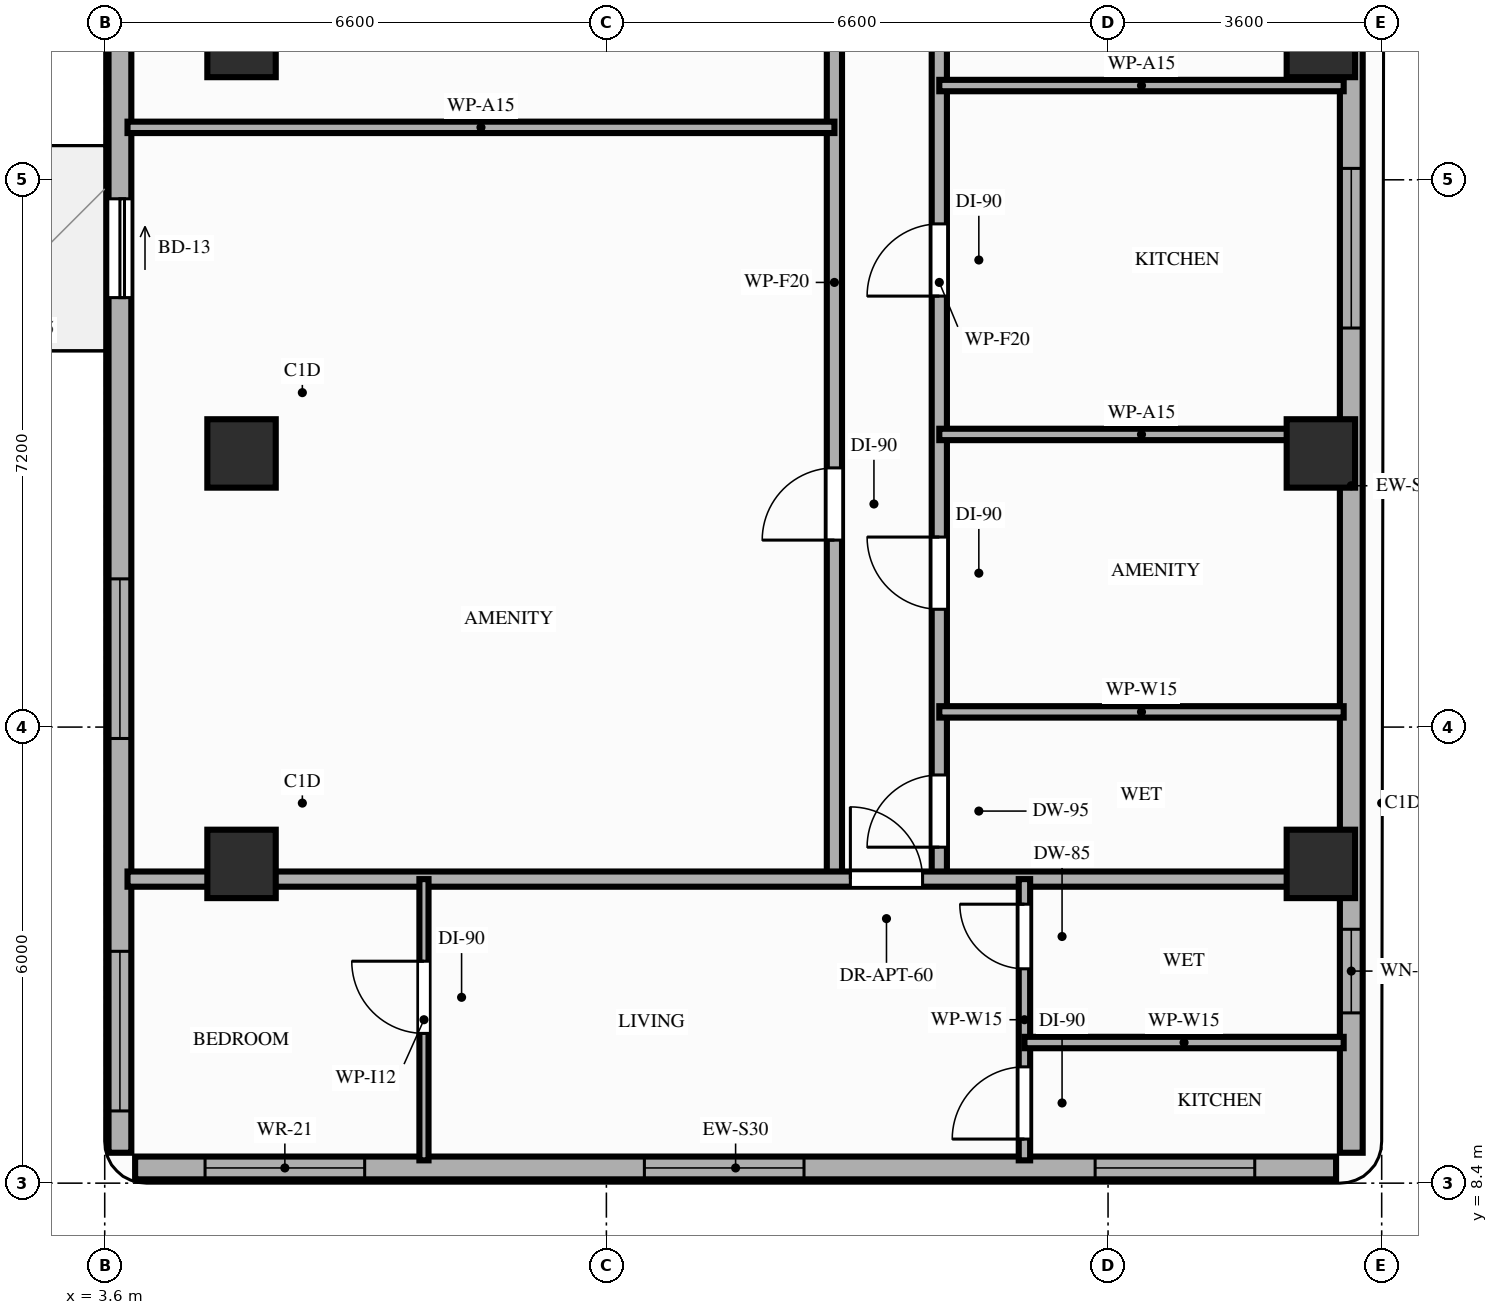
"""IFC4 building model, lengths in metres.
Left out: names, types, materials, properties, quantities, classifications, styles, units other than length and angle.
Written with IfcOpenShell. Run it as: python <this file> out.ifc"""

import sys

from ifc_helpers import new_model, si_unit, direction, frame, frame_2d, origin, origin_2d, place, context, subcontext, project, spatial, rectangle, extrude, element, fill, save


model = new_model("IFC4")
c1 = context("Model", 3, precision=1e-05, world=origin(), true_north=direction((0.0, 1.0)))
c2 = subcontext(c1, "Body", "Model", "MODEL_VIEW")
j1 = project(units=[si_unit("LENGTHUNIT", "METRE"), si_unit("PLANEANGLEUNIT", "RADIAN")], contexts=[c1])
p1 = place(None, origin())
s1 = spatial("IfcSite", under=j1, at=p1, CompositionType="ELEMENT")
p2 = place(p1, origin())
s2 = spatial("IfcBuilding", under=s1, at=p2, CompositionType="ELEMENT")
p3 = place(p2, frame((0.0, 0.0, 163.2)))
s3 = spatial("IfcBuildingStorey", under=s2, at=p3, CompositionType="ELEMENT", Elevation=163.2)
for number, where, z_axis, x_axis in (
    (1, (5.4, 12.6, 0.0), (0.0, 0.0, 1.0), (1.0, 0.0, 0.0)),
    (2, (19.6, 12.6, 0.0), (0.0, 0.0, 1.0), (1.0, 0.0, 0.0)),
    (3, (5.4, 18.0, 0.0), (0.0, 0.0, 1.0), (1.0, 0.0, 0.0)),
    (4, (19.6, 18.0, 0.0), (0.0, 0.0, 1.0), (1.0, 0.0, 0.0)),
    (5, (5.4, 23.4, 0.0), (0.0, 0.0, 1.0), (1.0, 0.0, 0.0)),
    (6, (19.6, 23.4, 0.0), (0.0, 0.0, 1.0), (1.0, 0.0, 0.0)),
):
    element("IfcColumn", number, at=place(p3, frame(where, z_axis=z_axis, x_axis=x_axis)), inside=s3, PredefinedType="COLUMN", context=c2, shape_type="SweptSolid", body=[
        extrude(rectangle(XDim=0.9, YDim=0.9, at=origin_2d()), origin(), (0.0, 0.0, 1.0), 3.2),
    ])
p4 = place(p3, frame((4.0, 8.6, 0.0), z_axis=(0.0, 0.0, 1.0), x_axis=(1.0, 0.0, 0.0)))
e7 = element("IfcWall", 7, at=p4, inside=s3, PredefinedType="STANDARD", context=c2, shape_type="SweptSolid", body=[
    extrude(rectangle(XDim=15.8, YDim=0.3, at=frame_2d((7.9, 0.0))), origin(), (0.0, 0.0, 1.0), 3.02),
])
p5 = place(p4, frame((0.92, 0.0, 0.85)))
e8 = element("IfcOpeningElement", 8, at=p5, cuts=e7, PredefinedType="OPENING", context=c2, shape_type="SweptSolid", body=[
    extrude(rectangle(XDim=2.1, YDim=1.8, at=frame_2d((1.05, 0.9))), frame((0.0, 0.16, 0.0), z_axis=(0.0, -1.0, 0.0), x_axis=(1.0, 0.0, 0.0)), (0.0, 0.0, 1.0), 0.32),
])
p6 = place(p4, frame((6.7, 0.0, 0.85)))
e9 = element("IfcOpeningElement", 9, at=p6, cuts=e7, PredefinedType="OPENING", context=c2, shape_type="SweptSolid", body=[
    extrude(rectangle(XDim=2.1, YDim=1.8, at=frame_2d((1.05, 0.9))), frame((0.0, 0.16, 0.0), z_axis=(0.0, -1.0, 0.0), x_axis=(1.0, 0.0, 0.0)), (0.0, 0.0, 1.0), 0.32),
])
p7 = place(p4, frame((12.63, 0.0, 0.85)))
e10 = element("IfcOpeningElement", 10, at=p7, cuts=e7, PredefinedType="OPENING", context=c2, shape_type="SweptSolid", body=[
    extrude(rectangle(XDim=2.1, YDim=1.8, at=frame_2d((1.05, 0.9))), frame((0.0, 0.16, 0.0), z_axis=(0.0, -1.0, 0.0), x_axis=(1.0, 0.0, 0.0)), (0.0, 0.0, 1.0), 0.32),
])
p8 = place(p3, frame((3.8, 42.1, 0.0), z_axis=(0.0, 0.0, 1.0), x_axis=(0.0, -1.0, 0.0)))
e11 = element("IfcWall", 11, at=p8, inside=s3, PredefinedType="STANDARD", context=c2, shape_type="SweptSolid", body=[
    extrude(rectangle(XDim=33.3, YDim=0.3, at=frame_2d((16.65, 0.0))), origin(), (0.0, 0.0, 1.0), 2.71),
])
p9 = place(p8, frame((20.75, 0.0, 0.0)))
e12 = element("IfcOpeningElement", 12, at=p9, cuts=e11, PredefinedType="OPENING", context=c2, shape_type="SweptSolid", body=[
    extrude(rectangle(XDim=1.3, YDim=2.08, at=frame_2d((0.65, 1.04))), frame((0.0, 0.16, 0.0), z_axis=(0.0, -1.0, 0.0), x_axis=(1.0, 0.0, 0.0)), (0.0, 0.0, 1.0), 0.32),
])
p10 = place(p8, frame((30.65, 0.0, 0.85)))
e13 = element("IfcOpeningElement", 13, at=p10, cuts=e11, PredefinedType="OPENING", context=c2, shape_type="SweptSolid", body=[
    extrude(rectangle(XDim=2.1, YDim=1.61, at=frame_2d((1.05, 0.805))), frame((0.0, 0.16, 0.0), z_axis=(0.0, -1.0, 0.0), x_axis=(1.0, 0.0, 0.0)), (0.0, 0.0, 1.0), 0.32),
])
p11 = place(p8, frame((25.75, 0.0, 0.85)))
e14 = element("IfcOpeningElement", 14, at=p11, cuts=e11, PredefinedType="OPENING", context=c2, shape_type="SweptSolid", body=[
    extrude(rectangle(XDim=2.1, YDim=1.61, at=frame_2d((1.05, 0.805))), frame((0.0, 0.16, 0.0), z_axis=(0.0, -1.0, 0.0), x_axis=(1.0, 0.0, 0.0)), (0.0, 0.0, 1.0), 0.32),
])
p12 = place(p8, frame((14.95, 0.0, 0.85)))
e15 = element("IfcOpeningElement", 15, at=p12, cuts=e11, PredefinedType="OPENING", context=c2, shape_type="SweptSolid", body=[
    extrude(rectangle(XDim=2.1, YDim=1.61, at=frame_2d((1.05, 0.805))), frame((0.0, 0.16, 0.0), z_axis=(0.0, -1.0, 0.0), x_axis=(1.0, 0.0, 0.0)), (0.0, 0.0, 1.0), 0.32),
])
p13 = place(p8, frame((9.75, 0.0, 0.85)))
e16 = element("IfcOpeningElement", 16, at=p13, cuts=e11, PredefinedType="OPENING", context=c2, shape_type="SweptSolid", body=[
    extrude(rectangle(XDim=2.1, YDim=1.61, at=frame_2d((1.05, 0.805))), frame((0.0, 0.16, 0.0), z_axis=(0.0, -1.0, 0.0), x_axis=(1.0, 0.0, 0.0)), (0.0, 0.0, 1.0), 0.32),
])
p14 = place(p8, frame((3.65, 0.0, 0.85)))
e17 = element("IfcOpeningElement", 17, at=p14, cuts=e11, PredefinedType="OPENING", context=c2, shape_type="SweptSolid", body=[
    extrude(rectangle(XDim=2.1, YDim=1.61, at=frame_2d((1.05, 0.805))), frame((0.0, 0.16, 0.0), z_axis=(0.0, -1.0, 0.0), x_axis=(1.0, 0.0, 0.0)), (0.0, 0.0, 1.0), 0.32),
])
p15 = place(p3, frame((20.0, 8.8, 0.0), z_axis=(0.0, 0.0, 1.0), x_axis=(0.0, 1.0, 0.0)))
e18 = element("IfcWall", 18, at=p15, inside=s3, PredefinedType="STANDARD", context=c2, shape_type="SweptSolid", body=[
    extrude(rectangle(XDim=17.55, YDim=0.3, at=frame_2d((8.775, 0.0))), origin(), (0.0, 0.0, 1.0), 2.45),
])
p16 = place(p15, frame((1.84, 0.0, 0.85)))
e19 = element("IfcOpeningElement", 19, at=p16, cuts=e18, PredefinedType="OPENING", context=c2, shape_type="SweptSolid", body=[
    extrude(rectangle(XDim=1.1, YDim=1.35, at=frame_2d((0.55, 0.675))), frame((0.0, 0.16, 0.0), z_axis=(0.0, -1.0, 0.0), x_axis=(1.0, 0.0, 0.0)), (0.0, 0.0, 1.0), 0.32),
])
p17 = place(p15, frame((10.85, 0.0, 0.85)))
e20 = element("IfcOpeningElement", 20, at=p17, cuts=e18, PredefinedType="OPENING", context=c2, shape_type="SweptSolid", body=[
    extrude(rectangle(XDim=2.1, YDim=1.35, at=frame_2d((1.05, 0.675))), frame((0.0, 0.16, 0.0), z_axis=(0.0, -1.0, 0.0), x_axis=(1.0, 0.0, 0.0)), (0.0, 0.0, 1.0), 0.32),
])
p18 = place(p3, frame((13.2, 12.4, 0.0), z_axis=(0.0, 0.0, 1.0), x_axis=(0.0, 1.0, 0.0)))
e21 = element("IfcWall", 21, at=p18, inside=s3, PredefinedType="PARTITIONING", context=c2, shape_type="SweptSolid", body=[
    extrude(rectangle(XDim=15.7, YDim=0.2, at=frame_2d((7.85, 0.0))), origin(), (0.0, 0.0, 1.0), 2.45),
])
p19 = place(p18, frame((4.46, 0.0, 0.0)))
e22 = element("IfcOpeningElement", 22, at=p19, cuts=e21, PredefinedType="OPENING", context=c2, shape_type="SweptSolid", body=[
    extrude(rectangle(XDim=0.95, YDim=2.15, at=frame_2d((0.475, 1.075))), frame((0.0, 0.11, 0.0), z_axis=(0.0, -1.0, 0.0), x_axis=(1.0, 0.0, 0.0)), (0.0, 0.0, 1.0), 0.22),
])
p20 = place(p18, frame((12.31, 0.0, 0.0)))
e23 = element("IfcOpeningElement", 23, at=p20, cuts=e21, PredefinedType="OPENING", context=c2, shape_type="SweptSolid", body=[
    extrude(rectangle(XDim=0.95, YDim=2.15, at=frame_2d((0.475, 1.075))), frame((0.0, 0.11, 0.0), z_axis=(0.0, -1.0, 0.0), x_axis=(1.0, 0.0, 0.0)), (0.0, 0.0, 1.0), 0.22),
])
p21 = place(p3, frame((14.58, 12.4, 0.0), z_axis=(0.0, 0.0, 1.0), x_axis=(0.0, 1.0, 0.0)))
e24 = element("IfcWall", 24, at=p21, inside=s3, PredefinedType="PARTITIONING", context=c2, shape_type="SweptSolid", body=[
    extrude(rectangle(XDim=15.7, YDim=0.2, at=frame_2d((7.85, 0.0))), origin(), (0.0, 0.0, 1.0), 2.45),
])
p22 = place(p21, frame((0.42, 0.0, 0.0)))
e25 = element("IfcOpeningElement", 25, at=p22, cuts=e24, PredefinedType="OPENING", context=c2, shape_type="SweptSolid", body=[
    extrude(rectangle(XDim=0.95, YDim=2.1, at=frame_2d((0.475, 1.05))), frame((0.0, 0.11, 0.0), z_axis=(0.0, -1.0, 0.0), x_axis=(1.0, 0.0, 0.0)), (0.0, 0.0, 1.0), 0.22),
])
p23 = place(p21, frame((3.55, 0.0, 0.0)))
e26 = element("IfcOpeningElement", 26, at=p23, cuts=e24, PredefinedType="OPENING", context=c2, shape_type="SweptSolid", body=[
    extrude(rectangle(XDim=0.95, YDim=2.15, at=frame_2d((0.475, 1.075))), frame((0.0, 0.11, 0.0), z_axis=(0.0, -1.0, 0.0), x_axis=(1.0, 0.0, 0.0)), (0.0, 0.0, 1.0), 0.22),
])
p24 = place(p21, frame((7.67, 0.0, 0.0)))
e27 = element("IfcOpeningElement", 27, at=p24, cuts=e24, PredefinedType="OPENING", context=c2, shape_type="SweptSolid", body=[
    extrude(rectangle(XDim=0.95, YDim=2.15, at=frame_2d((0.475, 1.075))), frame((0.0, 0.11, 0.0), z_axis=(0.0, -1.0, 0.0), x_axis=(1.0, 0.0, 0.0)), (0.0, 0.0, 1.0), 0.22),
])
p25 = place(p21, frame((12.59, 0.0, 0.0)))
e28 = element("IfcOpeningElement", 28, at=p25, cuts=e24, PredefinedType="OPENING", context=c2, shape_type="SweptSolid", body=[
    extrude(rectangle(XDim=0.95, YDim=2.15, at=frame_2d((0.475, 1.075))), frame((0.0, 0.11, 0.0), z_axis=(0.0, -1.0, 0.0), x_axis=(1.0, 0.0, 0.0)), (0.0, 0.0, 1.0), 0.22),
])
p26 = place(p3, frame((3.9, 12.4, 0.0), z_axis=(0.0, 0.0, 1.0), x_axis=(1.0, 0.0, 0.0)))
e29 = element("IfcWall", 29, at=p26, inside=s3, PredefinedType="PARTITIONING", context=c2, shape_type="SweptSolid", body=[
    extrude(rectangle(XDim=16.0, YDim=0.2, at=frame_2d((8.0, 0.0))), origin(), (0.0, 0.0, 1.0), 2.45),
])
p27 = place(p26, frame((9.51, 0.0, 0.0)))
e30 = element("IfcOpeningElement", 30, at=p27, cuts=e29, PredefinedType="OPENING", context=c2, shape_type="SweptSolid", body=[
    extrude(rectangle(XDim=0.95, YDim=2.15, at=frame_2d((0.475, 1.075))), frame((0.0, 0.11, 0.0), z_axis=(0.0, -1.0, 0.0), x_axis=(1.0, 0.0, 0.0)), (0.0, 0.0, 1.0), 0.22),
])
p28 = place(p3, frame((7.8, 8.7, 0.0), z_axis=(0.0, 0.0, 1.0), x_axis=(0.0, 1.0, 0.0)))
e31 = element("IfcWall", 31, at=p28, inside=s3, PredefinedType="PARTITIONING", context=c2, shape_type="SweptSolid", body=[
    extrude(rectangle(XDim=3.7, YDim=0.12, at=frame_2d((1.85, 0.0))), origin(), (0.0, 0.0, 1.0), 2.45),
])
p29 = place(p28, frame((1.67, 0.0, 0.0)))
e32 = element("IfcOpeningElement", 32, at=p29, cuts=e31, PredefinedType="OPENING", context=c2, shape_type="SweptSolid", body=[
    extrude(rectangle(XDim=0.95, YDim=2.15, at=frame_2d((0.475, 1.075))), frame((0.0, 0.07, 0.0), z_axis=(0.0, -1.0, 0.0), x_axis=(1.0, 0.0, 0.0)), (0.0, 0.0, 1.0), 0.14),
])
p30 = place(p3, frame((15.7, 8.7, 0.0), z_axis=(0.0, 0.0, 1.0), x_axis=(0.0, 1.0, 0.0)))
e33 = element("IfcWall", 33, at=p30, inside=s3, PredefinedType="PARTITIONING", context=c2, shape_type="SweptSolid", body=[
    extrude(rectangle(XDim=3.7, YDim=0.15, at=frame_2d((1.85, 0.0))), origin(), (0.0, 0.0, 1.0), 2.45),
])
p31 = place(p30, frame((0.28, 0.0, 0.0)))
e34 = element("IfcOpeningElement", 34, at=p31, cuts=e33, PredefinedType="OPENING", context=c2, shape_type="SweptSolid", body=[
    extrude(rectangle(XDim=0.95, YDim=2.15, at=frame_2d((0.475, 1.075))), frame((0.0, 0.085, 0.0), z_axis=(0.0, -1.0, 0.0), x_axis=(1.0, 0.0, 0.0)), (0.0, 0.0, 1.0), 0.17),
])
p32 = place(p30, frame((2.52, 0.0, 0.0)))
e35 = element("IfcOpeningElement", 35, at=p32, cuts=e33, PredefinedType="OPENING", context=c2, shape_type="SweptSolid", body=[
    extrude(rectangle(XDim=0.85, YDim=2.1, at=frame_2d((0.425, 1.05))), frame((0.0, 0.085, 0.0), z_axis=(0.0, -1.0, 0.0), x_axis=(1.0, 0.0, 0.0)), (0.0, 0.0, 1.0), 0.17),
])
p33 = place(p3, frame((15.7, 10.25, 0.0), z_axis=(0.0, 0.0, 1.0), x_axis=(1.0, 0.0, 0.0)))
e36 = element("IfcWall", 36, at=p33, inside=s3, PredefinedType="PARTITIONING", context=c2, shape_type="SweptSolid", body=[
    extrude(rectangle(XDim=4.2, YDim=0.15, at=frame_2d((2.1, 0.0))), origin(), (0.0, 0.0, 1.0), 3.02),
])
p34 = place(p3, frame((3.9, 22.29, 0.0), z_axis=(0.0, 0.0, 1.0), x_axis=(1.0, 0.0, 0.0)))
e37 = element("IfcWall", 37, at=p34, inside=s3, PredefinedType="PARTITIONING", context=c2, shape_type="SweptSolid", body=[
    extrude(rectangle(XDim=9.3, YDim=0.15, at=frame_2d((4.65, 0.0))), origin(), (0.0, 0.0, 1.0), 2.45),
])
for number, where, z_axis, x_axis in (
    (38, (14.58, 14.6, 0.0), (0.0, 0.0, 1.0), (1.0, 0.0, 0.0)),
    (39, (14.58, 18.25, 0.0), (0.0, 0.0, 1.0), (1.0, 0.0, 0.0)),
    (40, (14.58, 22.84, 0.0), (0.0, 0.0, 1.0), (1.0, 0.0, 0.0)),
):
    element("IfcWall", number, at=place(p3, frame(where, z_axis=z_axis, x_axis=x_axis)), inside=s3, PredefinedType="PARTITIONING", context=c2, shape_type="SweptSolid", body=[
        extrude(rectangle(XDim=5.32, YDim=0.15, at=frame_2d((2.66, 0.0))), origin(), (0.0, 0.0, 1.0), 2.45),
    ])
p35 = place(p9, origin())
e41 = element("IfcDoor", 41, at=p35, inside=s3, OperationType="SLIDING_TO_LEFT", PredefinedType="DOOR", context=c2, shape_type="SweptSolid", body=[
    extrude(rectangle(XDim=1.3, YDim=2.08, at=frame_2d((0.65, 1.04))), frame((0.0, 0.025, 0.0), z_axis=(0.0, -1.0, 0.0), x_axis=(1.0, 0.0, 0.0)), (0.0, 0.0, 1.0), 0.05),
])
fill(e12, e41)
p36 = place(p5, origin())
e42 = element("IfcWindow", 42, at=p36, inside=s3, PartitioningType="SINGLE_PANEL", PredefinedType="WINDOW", context=c2, shape_type="SweptSolid", body=[
    extrude(rectangle(XDim=2.1, YDim=1.8, at=frame_2d((1.05, 0.9))), frame((0.0, 0.03, 0.0), z_axis=(0.0, -1.0, 0.0), x_axis=(1.0, 0.0, 0.0)), (0.0, 0.0, 1.0), 0.06),
])
fill(e8, e42)
p37 = place(p6, origin())
e43 = element("IfcWindow", 43, at=p37, inside=s3, PartitioningType="SINGLE_PANEL", PredefinedType="WINDOW", context=c2, shape_type="SweptSolid", body=[
    extrude(rectangle(XDim=2.1, YDim=1.8, at=frame_2d((1.05, 0.9))), frame((0.0, 0.03, 0.0), z_axis=(0.0, -1.0, 0.0), x_axis=(1.0, 0.0, 0.0)), (0.0, 0.0, 1.0), 0.06),
])
fill(e9, e43)
p38 = place(p7, origin())
e44 = element("IfcWindow", 44, at=p38, inside=s3, PartitioningType="SINGLE_PANEL", PredefinedType="WINDOW", context=c2, shape_type="SweptSolid", body=[
    extrude(rectangle(XDim=2.1, YDim=1.8, at=frame_2d((1.05, 0.9))), frame((0.0, 0.03, 0.0), z_axis=(0.0, -1.0, 0.0), x_axis=(1.0, 0.0, 0.0)), (0.0, 0.0, 1.0), 0.06),
])
fill(e10, e44)
p39 = place(p16, origin())
e45 = element("IfcWindow", 45, at=p39, inside=s3, PartitioningType="SINGLE_PANEL", PredefinedType="WINDOW", context=c2, shape_type="SweptSolid", body=[
    extrude(rectangle(XDim=1.1, YDim=1.35, at=frame_2d((0.55, 0.675))), frame((0.0, 0.03, 0.0), z_axis=(0.0, -1.0, 0.0), x_axis=(1.0, 0.0, 0.0)), (0.0, 0.0, 1.0), 0.06),
])
fill(e19, e45)
p40 = place(p10, origin())
e46 = element("IfcWindow", 46, at=p40, inside=s3, PartitioningType="SINGLE_PANEL", PredefinedType="WINDOW", context=c2, shape_type="SweptSolid", body=[
    extrude(rectangle(XDim=2.1, YDim=1.61, at=frame_2d((1.05, 0.805))), frame((0.0, 0.03, 0.0), z_axis=(0.0, -1.0, 0.0), x_axis=(1.0, 0.0, 0.0)), (0.0, 0.0, 1.0), 0.06),
])
fill(e13, e46)
p41 = place(p11, origin())
e47 = element("IfcWindow", 47, at=p41, inside=s3, PartitioningType="SINGLE_PANEL", PredefinedType="WINDOW", context=c2, shape_type="SweptSolid", body=[
    extrude(rectangle(XDim=2.1, YDim=1.61, at=frame_2d((1.05, 0.805))), frame((0.0, 0.03, 0.0), z_axis=(0.0, -1.0, 0.0), x_axis=(1.0, 0.0, 0.0)), (0.0, 0.0, 1.0), 0.06),
])
fill(e14, e47)
p42 = place(p17, origin())
e48 = element("IfcWindow", 48, at=p42, inside=s3, PartitioningType="SINGLE_PANEL", PredefinedType="WINDOW", context=c2, shape_type="SweptSolid", body=[
    extrude(rectangle(XDim=2.1, YDim=1.35, at=frame_2d((1.05, 0.675))), frame((0.0, 0.03, 0.0), z_axis=(0.0, -1.0, 0.0), x_axis=(1.0, 0.0, 0.0)), (0.0, 0.0, 1.0), 0.06),
])
fill(e20, e48)
p43 = place(p27, origin())
e49 = element("IfcDoor", 49, at=p43, inside=s3, OperationType="SINGLE_SWING_LEFT", PredefinedType="DOOR", context=c2, shape_type="SweptSolid", body=[
    extrude(rectangle(XDim=0.95, YDim=2.15, at=frame_2d((0.475, 1.075))), frame((0.0, 0.025, 0.0), z_axis=(0.0, -1.0, 0.0), x_axis=(1.0, 0.0, 0.0)), (0.0, 0.0, 1.0), 0.05),
])
fill(e30, e49)
p44 = place(p29, origin())
e50 = element("IfcDoor", 50, at=p44, inside=s3, OperationType="SINGLE_SWING_RIGHT", PredefinedType="DOOR", context=c2, shape_type="SweptSolid", body=[
    extrude(rectangle(XDim=0.95, YDim=2.15, at=frame_2d((0.475, 1.075))), frame((0.0, 0.025, 0.0), z_axis=(0.0, -1.0, 0.0), x_axis=(1.0, 0.0, 0.0)), (0.0, 0.0, 1.0), 0.05),
])
fill(e32, e50)
p45 = place(p31, origin())
e51 = element("IfcDoor", 51, at=p45, inside=s3, OperationType="SINGLE_SWING_LEFT", PredefinedType="DOOR", context=c2, shape_type="SweptSolid", body=[
    extrude(rectangle(XDim=0.95, YDim=2.15, at=frame_2d((0.475, 1.075))), frame((0.0, 0.025, 0.0), z_axis=(0.0, -1.0, 0.0), x_axis=(1.0, 0.0, 0.0)), (0.0, 0.0, 1.0), 0.05),
])
fill(e34, e51)
p46 = place(p32, origin())
e52 = element("IfcDoor", 52, at=p46, inside=s3, OperationType="SINGLE_SWING_RIGHT", PredefinedType="DOOR", context=c2, shape_type="SweptSolid", body=[
    extrude(rectangle(XDim=0.85, YDim=2.1, at=frame_2d((0.425, 1.05))), frame((0.0, 0.025, 0.0), z_axis=(0.0, -1.0, 0.0), x_axis=(1.0, 0.0, 0.0)), (0.0, 0.0, 1.0), 0.05),
])
fill(e35, e52)
p47 = place(p19, origin())
e53 = element("IfcDoor", 53, at=p47, inside=s3, OperationType="SINGLE_SWING_LEFT", PredefinedType="DOOR", context=c2, shape_type="SweptSolid", body=[
    extrude(rectangle(XDim=0.95, YDim=2.15, at=frame_2d((0.475, 1.075))), frame((0.0, 0.025, 0.0), z_axis=(0.0, -1.0, 0.0), x_axis=(1.0, 0.0, 0.0)), (0.0, 0.0, 1.0), 0.05),
])
fill(e22, e53)
p48 = place(p22, origin())
e54 = element("IfcDoor", 54, at=p48, inside=s3, OperationType="SINGLE_SWING_LEFT", PredefinedType="DOOR", context=c2, shape_type="SweptSolid", body=[
    extrude(rectangle(XDim=0.95, YDim=2.1, at=frame_2d((0.475, 1.05))), frame((0.0, 0.025, 0.0), z_axis=(0.0, -1.0, 0.0), x_axis=(1.0, 0.0, 0.0)), (0.0, 0.0, 1.0), 0.05),
])
fill(e25, e54)
p49 = place(p23, origin())
e55 = element("IfcDoor", 55, at=p49, inside=s3, OperationType="SINGLE_SWING_RIGHT", PredefinedType="DOOR", context=c2, shape_type="SweptSolid", body=[
    extrude(rectangle(XDim=0.95, YDim=2.15, at=frame_2d((0.475, 1.075))), frame((0.0, 0.025, 0.0), z_axis=(0.0, -1.0, 0.0), x_axis=(1.0, 0.0, 0.0)), (0.0, 0.0, 1.0), 0.05),
])
fill(e26, e55)
p50 = place(p24, origin())
e56 = element("IfcDoor", 56, at=p50, inside=s3, OperationType="SINGLE_SWING_LEFT", PredefinedType="DOOR", context=c2, shape_type="SweptSolid", body=[
    extrude(rectangle(XDim=0.95, YDim=2.15, at=frame_2d((0.475, 1.075))), frame((0.0, 0.025, 0.0), z_axis=(0.0, -1.0, 0.0), x_axis=(1.0, 0.0, 0.0)), (0.0, 0.0, 1.0), 0.05),
])
fill(e27, e56)
save(model, sys.argv[1])
